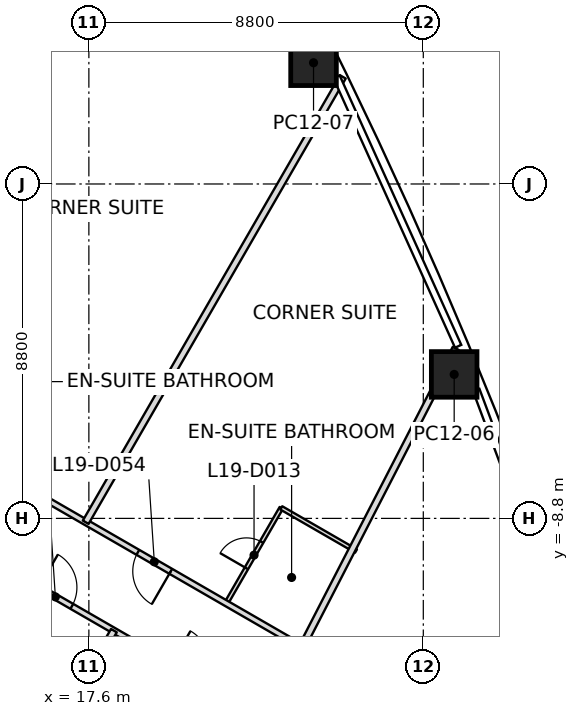
"""IFC4 building model, lengths in metres.
Left out: names, types, materials, properties, quantities, classifications, styles, units other than length and angle.
Written with IfcOpenShell. Run it as: python <this file> out.ifc"""

import sys

from ifc_helpers import new_model, si_unit, direction, frame, frame_2d, origin, origin_2d, place, context, subcontext, project, spatial, rectangle, extrude, element, fill, save


model = new_model("IFC4")
c1 = context("Model", 3, precision=1e-05, world=origin(), true_north=direction((0.0, 1.0)))
c2 = subcontext(c1, "Body", "Model", "MODEL_VIEW")
j1 = project(units=[si_unit("LENGTHUNIT", "METRE"), si_unit("PLANEANGLEUNIT", "RADIAN")], contexts=[c1])
p1 = place(None, origin())
s1 = spatial("IfcSite", under=j1, at=p1, CompositionType="ELEMENT")
p2 = place(p1, origin())
s2 = spatial("IfcBuilding", under=s1, at=p2, CompositionType="ELEMENT")
p3 = place(p2, frame((0.0, 0.0, 92.4)))
s3 = spatial("IfcBuildingStorey", under=s2, at=p3, CompositionType="ELEMENT", Elevation=92.4)
p4 = place(p3, frame((27.212, -5.011, 0.0), z_axis=(-0.019393432612, 0.011015997436, 0.999751240345), x_axis=(-0.380717970692, 0.924524223098, -0.017572356073)))
e1 = element("IfcColumn", 1, at=p4, inside=s3, PredefinedType="COLUMN", context=c2, shape_type="SweptSolid", body=[
    extrude(rectangle(XDim=1.2, YDim=1.2, at=origin_2d()), origin(), (0.0, 0.0, 1.0), 3.701),
])
p5 = place(p3, frame((23.512, 3.19, 0.0), z_axis=(-0.015305637388, 0.002243067548, 0.999880345898), x_axis=(-0.441317903512, 0.897307986586, -0.008768423407)))
e2 = element("IfcColumn", 2, at=p5, inside=s3, PredefinedType="COLUMN", context=c2, shape_type="SweptSolid", body=[
    extrude(rectangle(XDim=1.2, YDim=1.2, at=origin_2d()), origin(), (0.0, 0.0, 1.0), 3.701),
])
p6 = place(p3, frame((18.259, -11.754, 0.0), z_axis=(0.0, 0.0, 1.0), x_axis=(-0.499994892108, -0.866028352807, 0.0)))
e3 = element("IfcWall", 3, at=p6, inside=s3, PredefinedType="PARTITIONING", context=c2, shape_type="SweptSolid", body=[
    extrude(rectangle(XDim=10.317, YDim=0.175, at=frame_2d((5.158, 0.0))), origin(), (0.0, 0.0, 1.0), 3.093),
])
p7 = place(p3, frame((17.517, -8.901, 0.0), z_axis=(0.0, 0.0, 1.0), x_axis=(0.500006156857, 0.866021849092, 0.0)))
e4 = element("IfcWall", 4, at=p7, inside=s3, PredefinedType="PARTITIONING", context=c2, shape_type="SweptSolid", body=[
    extrude(rectangle(XDim=13.532, YDim=0.175, at=frame_2d((6.766, 0.0))), origin(), (0.0, 0.0, 1.0), 2.934),
])
p8 = place(p3, frame((27.253, -4.326, 0.0), z_axis=(0.0, 0.0, 1.0), x_axis=(-0.457797857942, -0.889056309389, 0.0)))
e5 = element("IfcWall", 5, at=p8, inside=s3, PredefinedType="PARTITIONING", context=c2, shape_type="SweptSolid", body=[
    extrude(rectangle(XDim=8.84, YDim=0.175, at=frame_2d((4.42, 0.0))), origin(), (0.0, 0.0, 1.0), 3.15),
])
p9 = place(p3, frame((13.179, -8.822, 0.0), z_axis=(0.0, 0.0, 1.0), x_axis=(0.866025889145, -0.499999159329, 0.0)))
e6 = element("IfcWall", 6, at=p9, inside=s3, PredefinedType="PARTITIONING", context=c2, shape_type="SweptSolid", body=[
    extrude(rectangle(XDim=10.285, YDim=0.15, at=frame_2d((5.143, 0.0))), origin(), (0.0, 0.0, 1.0), 2.797),
])
p10 = place(p9, frame((3.587, 0.0, 0.0)))
e7 = element("IfcOpeningElement", 7, at=p10, cuts=e6, PredefinedType="OPENING", context=c2, shape_type="SweptSolid", body=[
    extrude(rectangle(XDim=1.0, YDim=2.1, at=frame_2d((0.5, 1.05))), frame((0.0, 0.075, 0.0), z_axis=(0.0, -1.0, 0.0), x_axis=(1.0, 0.0, 0.0)), (0.0, 0.0, 1.0), 0.15),
])
p11 = place(p9, frame((7.615, 0.0, 0.0)))
e8 = element("IfcOpeningElement", 8, at=p11, cuts=e6, PredefinedType="OPENING", context=c2, shape_type="SweptSolid", body=[
    extrude(rectangle(XDim=1.0, YDim=2.1, at=frame_2d((0.5, 1.05))), frame((0.0, 0.075, 0.0), z_axis=(0.0, -1.0, 0.0), x_axis=(1.0, 0.0, 0.0)), (0.0, 0.0, 1.0), 0.15),
])
p12 = place(p3, frame((23.136, -12.145, 0.0), z_axis=(0.0, 0.0, 1.0), x_axis=(-0.866028069402, 0.499995382986, 0.0)))
e9 = element("IfcWall", 9, at=p12, inside=s3, PredefinedType="PARTITIONING", context=c2, shape_type="SweptSolid", body=[
    extrude(rectangle(XDim=11.589, YDim=0.15, at=frame_2d((5.794, 0.0))), origin(), (0.0, 0.0, 1.0), 2.947),
])
p13 = place(p12, frame((3.905, 0.0, 0.0)))
e10 = element("IfcOpeningElement", 10, at=p13, cuts=e9, PredefinedType="OPENING", context=c2, shape_type="SweptSolid", body=[
    extrude(rectangle(XDim=1.0, YDim=2.1, at=frame_2d((0.5, 1.05))), frame((0.0, 0.075, 0.0), z_axis=(0.0, -1.0, 0.0), x_axis=(1.0, 0.0, 0.0)), (0.0, 0.0, 1.0), 0.15),
])
p14 = place(p3, frame((21.229, -11.01, 0.0), z_axis=(0.0, 0.0, 1.0), x_axis=(0.499999802827, 0.866025517622, 0.0)))
e11 = element("IfcWall", 11, at=p14, inside=s3, PredefinedType="PARTITIONING", context=c2, shape_type="SweptSolid", body=[
    extrude(rectangle(XDim=2.87, YDim=0.1, at=frame_2d((1.435, 0.0))), origin(), (0.0, 0.0, 1.0), 3.15),
])
p15 = place(p14, frame((1.035, 0.0, 0.0)))
e12 = element("IfcOpeningElement", 12, at=p15, cuts=e11, PredefinedType="OPENING", context=c2, shape_type="SweptSolid", body=[
    extrude(rectangle(XDim=0.8, YDim=2.1, at=frame_2d((0.4, 1.05))), frame((0.0, 0.05, 0.0), z_axis=(0.0, -1.0, 0.0), x_axis=(1.0, 0.0, 0.0)), (0.0, 0.0, 1.0), 0.1),
])
p16 = place(p3, frame((22.664, -8.524, 0.0), z_axis=(0.0, 0.0, 1.0), x_axis=(0.866017224141, -0.500014167291, 0.0)))
e13 = element("IfcWall", 13, at=p16, inside=s3, PredefinedType="PARTITIONING", context=c2, shape_type="SweptSolid", body=[
    extrude(rectangle(XDim=2.27, YDim=0.1, at=frame_2d((1.135, 0.0))), origin(), (0.0, 0.0, 1.0), 3.15),
])
p17 = place(p10, origin())
e14 = element("IfcDoor", 14, at=p17, inside=s3, OperationType="SINGLE_SWING_LEFT", PredefinedType="DOOR", context=c2, shape_type="SweptSolid", body=[
    extrude(rectangle(XDim=1.0, YDim=2.1, at=frame_2d((0.5, 1.05))), frame((0.0, 0.025, 0.0), z_axis=(0.0, -1.0, 0.0), x_axis=(1.0, 0.0, 0.0)), (0.0, 0.0, 1.0), 0.05),
])
fill(e7, e14)
p18 = place(p13, origin())
e15 = element("IfcDoor", 15, at=p18, inside=s3, OperationType="SINGLE_SWING_LEFT", PredefinedType="DOOR", context=c2, shape_type="SweptSolid", body=[
    extrude(rectangle(XDim=1.0, YDim=2.1, at=frame_2d((0.5, 1.05))), frame((0.0, 0.025, 0.0), z_axis=(0.0, -1.0, 0.0), x_axis=(1.0, 0.0, 0.0)), (0.0, 0.0, 1.0), 0.05),
])
fill(e10, e15)
p19 = place(p15, origin())
e16 = element("IfcDoor", 16, at=p19, inside=s3, OperationType="SINGLE_SWING_LEFT", PredefinedType="DOOR", context=c2, shape_type="SweptSolid", body=[
    extrude(rectangle(XDim=0.8, YDim=2.1, at=frame_2d((0.4, 1.05))), frame((0.0, 0.025, 0.0), z_axis=(0.0, -1.0, 0.0), x_axis=(1.0, 0.0, 0.0)), (0.0, 0.0, 1.0), 0.05),
])
fill(e12, e16)
save(model, sys.argv[1])
